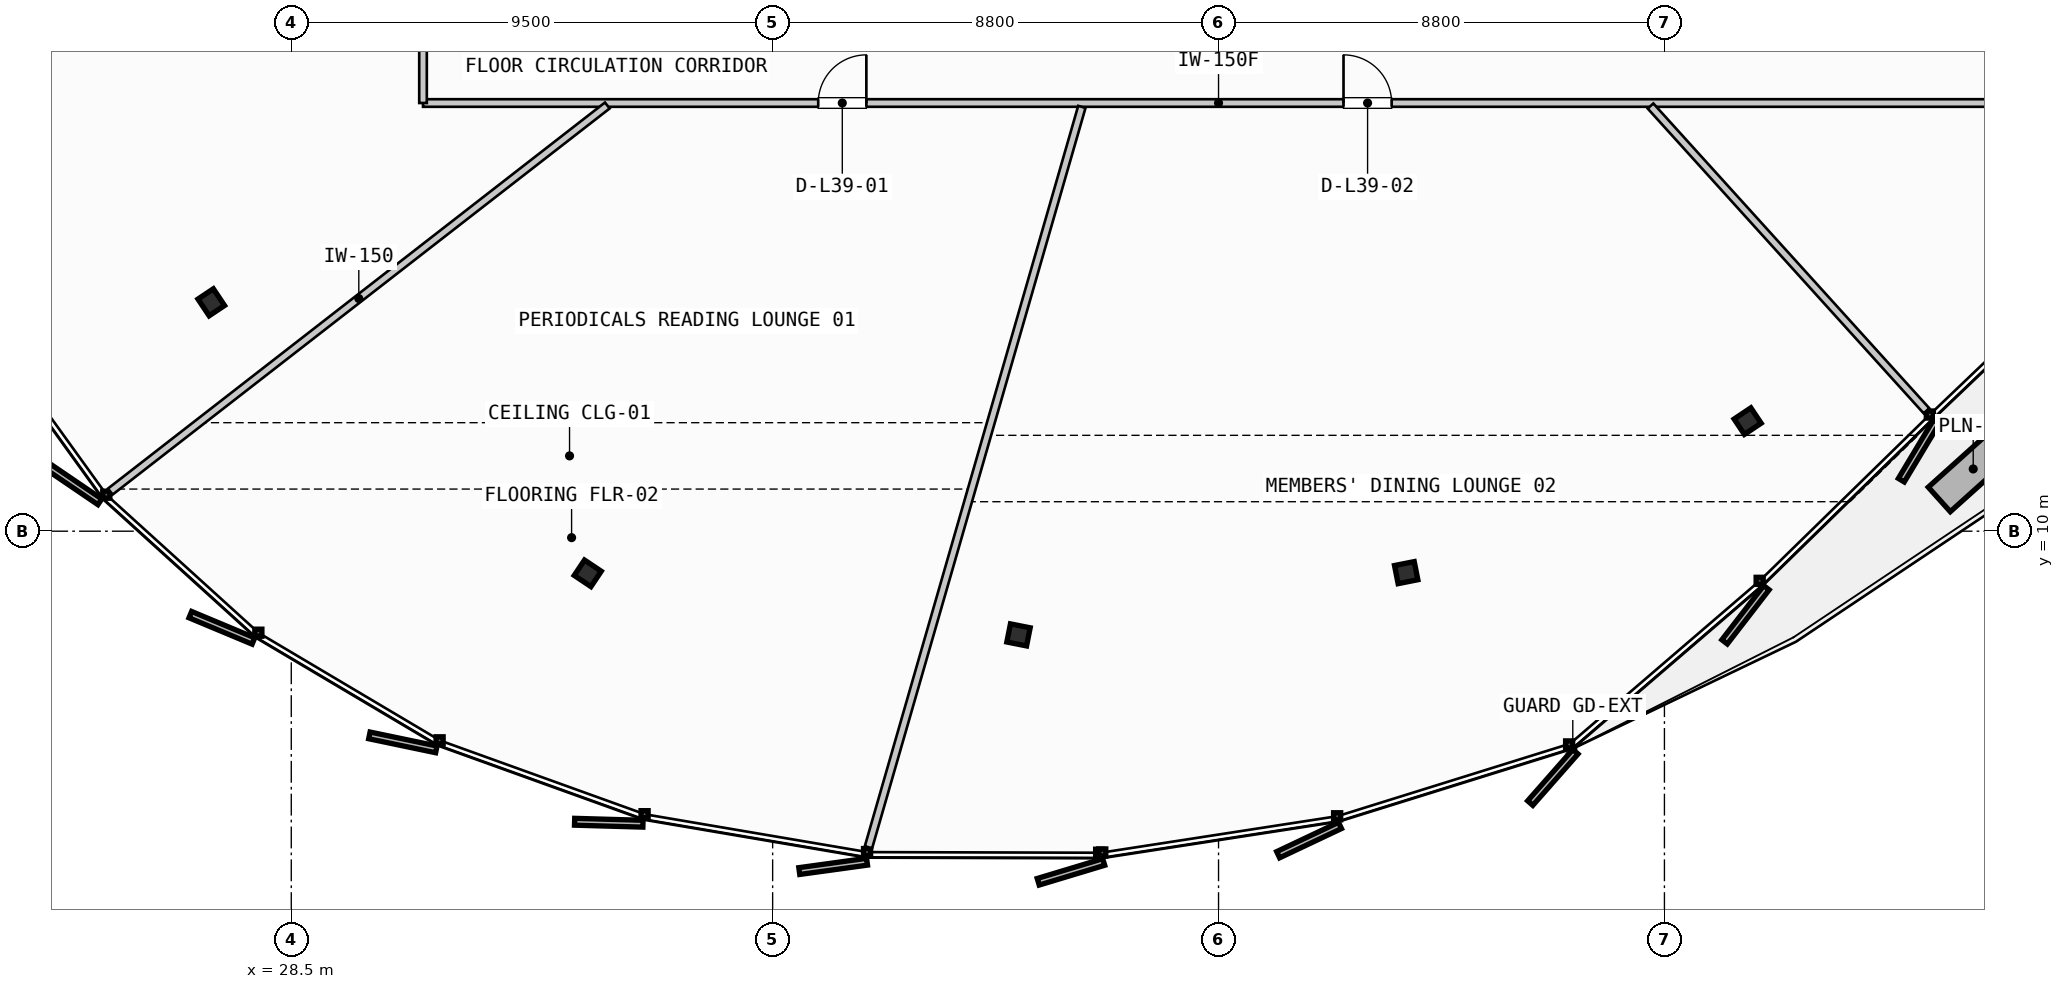
"""IFC4 building model, lengths in metres.
Left out: names, types, materials, properties, quantities, classifications, styles, units other than length and angle.
Written with IfcOpenShell. Run it as: python <this file> out.ifc"""

import sys

from ifc_helpers import new_model, si_unit, direction, frame, frame_2d, origin, origin_2d, place, context, subcontext, project, spatial, rectangle, i_section, extrude, source, transform, mapped, element, fill, save


model = new_model("IFC4")
c1 = context("Model", 3, precision=1e-05, world=origin(), true_north=direction((0.0, 1.0)))
c2 = subcontext(c1, "Body", "Model", "MODEL_VIEW")
j1 = project(units=[si_unit("LENGTHUNIT", "METRE"), si_unit("PLANEANGLEUNIT", "RADIAN")], contexts=[c1])
p1 = place(None, origin())
s1 = spatial("IfcSite", under=j1, at=p1, CompositionType="ELEMENT")
p2 = place(p1, origin())
s2 = spatial("IfcBuilding", under=s1, at=p2, CompositionType="ELEMENT")
p3 = place(p2, frame((0.0, 0.0, 153.65)))
s3 = spatial("IfcBuildingStorey", under=s2, at=p3, CompositionType="ELEMENT", Elevation=153.65)
m1 = source(origin(), c2, "Body", "SweptSolid", [
    extrude(i_section(OverallWidth=0.397, OverallDepth=0.365, WebThickness=0.028, FlangeThickness=0.044, FilletRadius=0.015, at=origin_2d()), origin(), (0.0, 0.0, 1.0), 3.3),
])
for number, where, z_axis, x_axis in (
    (1, (26.921, 14.517, 0.0), (0.0, 0.0, 1.0), (-0.831, -0.556, 0.0)),
    (2, (34.351, 9.168, 0.0), (0.0, 0.0, 1.0), (-0.556, -0.831, 0.0)),
    (3, (42.852, 7.954, 0.0), (0.0, 0.0, 1.0), (-0.195, -0.981, 0.0)),
    (4, (50.503, 9.182, 0.0), (0.0, 0.0, 1.0), (0.195, -0.981, 0.0)),
    (5, (57.242, 12.172, 0.0), (0.0, 0.0, 1.0), (0.556, -0.831, 0.0)),
):
    element("IfcColumn", number, at=place(p3, frame(where, z_axis=z_axis, x_axis=x_axis)), inside=s3, PredefinedType="COLUMN", context=c2, shape_type="MappedRepresentation", body=[
        mapped(m1, transform((0.0, 0.0, 0.0), scale=1.0)),
    ])
p4 = place(p3, frame((31.1, 18.45, 0.0), z_axis=(0.0, 0.0, 1.0), x_axis=(1.0, 0.0, 0.0)))
e6 = element("IfcWall", 6, at=p4, inside=s3, PredefinedType="PARTITIONING", context=c2, shape_type="SweptSolid", body=[
    extrude(rectangle(XDim=31.4, YDim=0.15, at=frame_2d((15.7, 0.0))), origin(), (0.0, 0.0, 1.0), 2.28),
])
p5 = place(p4, frame((7.8, 0.0, 0.0)))
e7 = element("IfcOpeningElement", 7, at=p5, cuts=e6, PredefinedType="OPENING", context=c2, shape_type="SweptSolid", body=[
    extrude(rectangle(XDim=0.95, YDim=2.15, at=frame_2d((0.475, 1.075))), frame((0.0, 0.085, 0.0), z_axis=(0.0, -1.0, 0.0), x_axis=(1.0, 0.0, 0.0)), (0.0, 0.0, 1.0), 0.17),
])
p6 = place(p4, frame((18.167, 0.0, 0.0)))
e8 = element("IfcOpeningElement", 8, at=p6, cuts=e6, PredefinedType="OPENING", context=c2, shape_type="SweptSolid", body=[
    extrude(rectangle(XDim=0.95, YDim=2.15, at=frame_2d((0.475, 1.075))), frame((0.0, 0.085, 0.0), z_axis=(0.0, -1.0, 0.0), x_axis=(1.0, 0.0, 0.0)), (0.0, 0.0, 1.0), 0.17),
])
p7 = place(p3, frame((31.1, 20.15, 0.0), z_axis=(0.0, 0.0, 1.0), x_axis=(0.0, -1.0, 0.0)))
e9 = element("IfcWall", 9, at=p7, inside=s3, PredefinedType="PARTITIONING", context=c2, shape_type="SweptSolid", body=[
    extrude(rectangle(XDim=1.7, YDim=0.15, at=frame_2d((0.85, 0.0))), origin(), (0.0, 0.0, 1.0), 2.28),
])
p8 = place(p3, frame((34.737, 18.401, 0.0), z_axis=(0.0, 0.0, 1.0), x_axis=(-0.789733105582, -0.613450586395, 0.0)))
e10 = element("IfcWall", 10, at=p8, inside=s3, PredefinedType="PARTITIONING", context=c2, shape_type="SweptSolid", body=[
    extrude(rectangle(XDim=12.42, YDim=0.15, at=frame_2d((6.21, 0.0))), origin(), (0.0, 0.0, 1.0), 2.28),
])
p9 = place(p3, frame((44.103, 18.373, 0.0), z_axis=(0.0, 0.0, 1.0), x_axis=(-0.276966229968, -0.960879652952, 0.0)))
e11 = element("IfcWall", 11, at=p9, inside=s3, PredefinedType="PARTITIONING", context=c2, shape_type="SweptSolid", body=[
    extrude(rectangle(XDim=15.205, YDim=0.15, at=frame_2d((7.602, 0.0))), origin(), (0.0, 0.0, 1.0), 2.28),
])
p10 = place(p3, frame((55.326, 18.391, 0.0), z_axis=(0.0, 0.0, 1.0), x_axis=(0.671197708212, -0.741278379889, 0.0)))
e12 = element("IfcWall", 12, at=p10, inside=s3, PredefinedType="PARTITIONING", context=c2, shape_type="SweptSolid", body=[
    extrude(rectangle(XDim=8.114, YDim=0.15, at=frame_2d((4.057, 0.0))), origin(), (0.0, 0.0, 1.0), 2.28),
])
m2 = source(origin(), c2, "Body", "SweptSolid", [
    extrude(rectangle(XDim=0.95, YDim=2.15, at=frame_2d((0.475, 1.075))), frame((0.0, 0.025, 0.0), z_axis=(0.0, -1.0, 0.0), x_axis=(1.0, 0.0, 0.0)), (0.0, 0.0, 1.0), 0.05),
])
p11 = place(p5, origin())
e13 = element("IfcDoor", 13, at=p11, inside=s3, OperationType="SINGLE_SWING_RIGHT", PredefinedType="DOOR", context=c2, shape_type="MappedRepresentation", body=[
    mapped(m2, transform((0.0, 0.0, 0.0), scale=1.0)),
])
fill(e7, e13)
p12 = place(p6, origin())
e14 = element("IfcDoor", 14, at=p12, inside=s3, OperationType="SINGLE_SWING_LEFT", PredefinedType="DOOR", context=c2, shape_type="MappedRepresentation", body=[
    mapped(m2, transform((0.0, 0.0, 0.0), scale=1.0)),
])
fill(e8, e14)
save(model, sys.argv[1])
